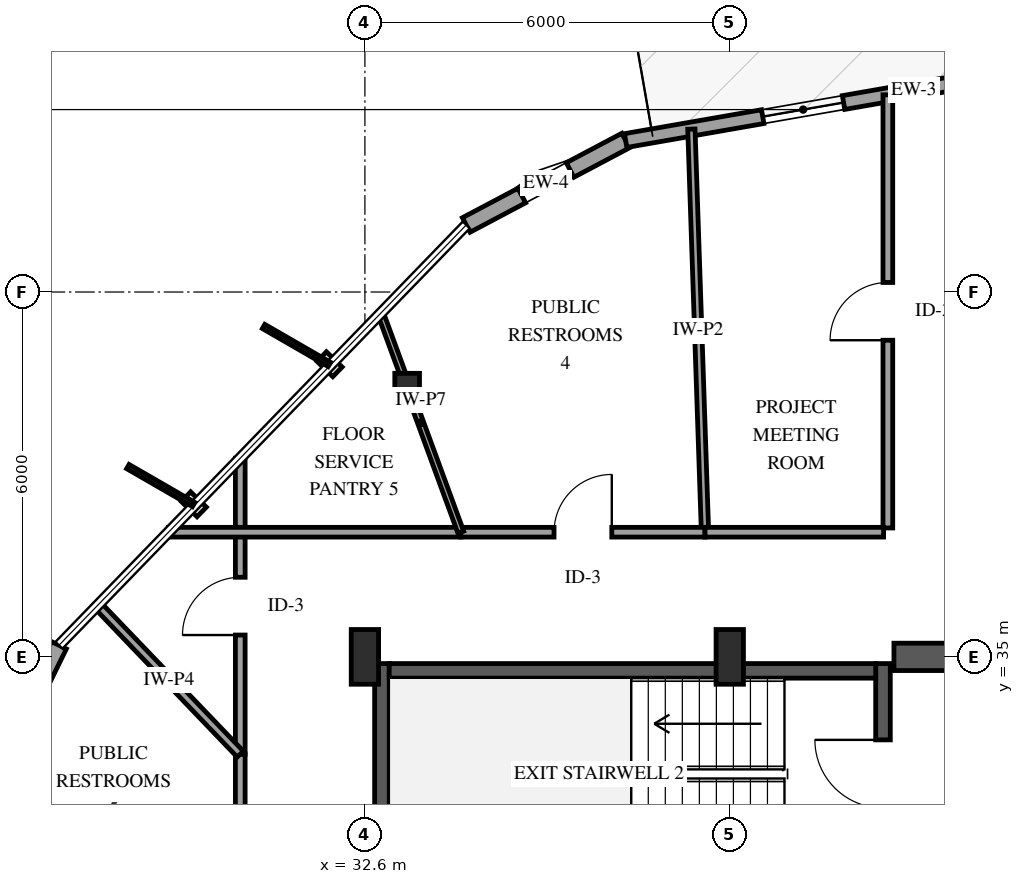
"""IFC4 building model, lengths in metres.
Left out: names, types, materials, properties, quantities, classifications, styles, units other than length and angle.
Written with IfcOpenShell. Run it as: python <this file> out.ifc"""

import sys

from ifc_helpers import new_model, si_unit, direction, frame, frame_2d, origin, origin_2d, place, context, subcontext, project, spatial, rectangle, i_section, extrude, element, fill, save


model = new_model("IFC4")
c1 = context("Model", 3, precision=1e-05, world=origin(), true_north=direction((0.0, 1.0)))
c2 = subcontext(c1, "Body", "Model", "MODEL_VIEW")
j1 = project(units=[si_unit("LENGTHUNIT", "METRE"), si_unit("PLANEANGLEUNIT", "RADIAN")], contexts=[c1])
p1 = place(None, origin())
s1 = spatial("IfcSite", under=j1, at=p1, CompositionType="ELEMENT")
p2 = place(p1, origin())
s2 = spatial("IfcBuilding", under=s1, at=p2, CompositionType="ELEMENT")
p3 = place(p2, frame((0.0, 0.0, 201.4)))
s3 = spatial("IfcBuildingStorey", under=s2, at=p3, CompositionType="ELEMENT", Elevation=201.4)
p4 = place(p3, frame((32.88, 31.26, 0.0), z_axis=(0.0, 0.0, 1.0), x_axis=(0.0, 1.0, 0.0)))
e1 = element("IfcWall", 1, at=p4, inside=s3, PredefinedType="SHEAR", context=c2, shape_type="SweptSolid", body=[
    extrude(rectangle(XDim=3.63, YDim=0.24, at=frame_2d((1.815, 0.0))), origin(), (0.0, 0.0, 1.0), 3.6),
])
p5 = place(p3, frame((41.12, 31.26, 0.0), z_axis=(0.0, 0.0, 1.0), x_axis=(0.0, 1.0, 0.0)))
e2 = element("IfcWall", 2, at=p5, inside=s3, PredefinedType="SHEAR", context=c2, shape_type="SweptSolid", body=[
    extrude(rectangle(XDim=3.63, YDim=0.24, at=frame_2d((1.815, 0.0))), origin(), (0.0, 0.0, 1.0), 3.6),
])
p6 = place(p5, frame((1.255, 0.0, 0.0)))
e3 = element("IfcOpeningElement", 3, at=p6, cuts=e2, PredefinedType="OPENING", context=c2, shape_type="SweptSolid", body=[
    extrude(rectangle(XDim=1.12, YDim=2.15, at=frame_2d((0.56, 1.075))), frame((0.0, 0.13, 0.0), z_axis=(0.0, -1.0, 0.0), x_axis=(1.0, 0.0, 0.0)), (0.0, 0.0, 1.0), 0.26),
])
p7 = place(p3, frame((33.0, 34.77, 0.0), z_axis=(0.0, 0.0, 1.0), x_axis=(1.0, 0.0, 0.0)))
e4 = element("IfcWall", 4, at=p7, inside=s3, PredefinedType="SHEAR", context=c2, shape_type="SweptSolid", body=[
    extrude(rectangle(XDim=8.0, YDim=0.24, at=frame_2d((4.0, 0.0))), origin(), (0.0, 0.0, 1.0), 3.6),
])
p8 = place(p3, frame((41.3, 35.0, 0.0), z_axis=(0.0, 0.0, 1.0), x_axis=(1.0, 0.0, 0.0)))
e5 = element("IfcWall", 5, at=p8, inside=s3, PredefinedType="SHEAR", context=c2, shape_type="SweptSolid", body=[
    extrude(rectangle(XDim=2.85, YDim=0.45, at=frame_2d((1.425, 0.0))), origin(), (0.0, 0.0, 1.0), 3.6),
])
for number, where, z_axis, x_axis in (
    (6, (32.6, 35.0, 0.0), (0.0, 0.0, 1.0), (1.0, 0.0, 0.0)),
    (7, (38.6, 35.0, 0.0), (0.0, 0.0, 1.0), (1.0, 0.0, 0.0)),
):
    element("IfcColumn", number, at=place(p3, frame(where, z_axis=z_axis, x_axis=x_axis)), inside=s3, PredefinedType="PILASTER", context=c2, shape_type="SweptSolid", body=[
        extrude(rectangle(XDim=0.45, YDim=0.9, at=origin_2d()), origin(), (0.0, 0.0, 1.0), 3.6),
    ])
p9 = place(p3, frame((33.295, 39.455, 0.0), z_axis=(0.0, 0.0, 1.0), x_axis=(1.0, 0.0, 0.0)))
e8 = element("IfcColumn", 8, at=p9, inside=s3, PredefinedType="COLUMN", context=c2, shape_type="SweptSolid", body=[
    extrude(i_section(OverallWidth=0.406, OverallDepth=0.416, WebThickness=0.03, FlangeThickness=0.048, FilletRadius=0.038, at=origin_2d()), origin(), (0.0, 0.0, 1.0), 3.6),
])
p10 = place(p3, frame((36.888, 43.49, 0.0), z_axis=(0.0, 0.0, 1.0), x_axis=(-0.883799927138, -0.467865032664, 0.0)))
e9 = element("IfcWall", 9, at=p10, inside=s3, PredefinedType="SOLIDWALL", context=c2, shape_type="SweptSolid", body=[
    extrude(rectangle(XDim=2.967, YDim=0.27, at=frame_2d((1.483, 0.0))), origin(), (0.0, 0.0, 1.0), 2.679),
])
p11 = place(p10, frame((1.033, 0.0, 0.75)))
e10 = element("IfcOpeningElement", 10, at=p11, cuts=e9, PredefinedType="OPENING", context=c2, shape_type="SweptSolid", body=[
    extrude(rectangle(XDim=0.9, YDim=1.5, at=frame_2d((0.45, 0.75))), frame((0.0, 0.145, 0.0), z_axis=(0.0, -1.0, 0.0), x_axis=(1.0, 0.0, 0.0)), (0.0, 0.0, 1.0), 0.29),
])
p12 = place(p3, frame((46.369, 45.145, 0.0), z_axis=(0.0, 0.0, 1.0), x_axis=(-0.985106934839, -0.171942801338, 0.0)))
e11 = element("IfcWall", 11, at=p12, inside=s3, PredefinedType="SOLIDWALL", context=c2, shape_type="SweptSolid", body=[
    extrude(rectangle(XDim=9.624, YDim=0.23, at=frame_2d((4.812, 0.0))), origin(), (0.0, 0.0, 1.0), 2.679),
])
p13 = place(p12, frame((0.65, 0.0, 0.0)))
e12 = element("IfcOpeningElement", 12, at=p13, cuts=e11, PredefinedType="OPENING", context=c2, shape_type="SweptSolid", body=[
    extrude(rectangle(XDim=1.0, YDim=2.15, at=frame_2d((0.5, 1.075))), frame((0.0, 0.125, 0.0), z_axis=(0.0, -1.0, 0.0), x_axis=(1.0, 0.0, 0.0)), (0.0, 0.0, 1.0), 0.25),
])
p14 = place(p12, frame((5.986, 0.0, 0.72)))
e13 = element("IfcOpeningElement", 13, at=p14, cuts=e11, PredefinedType="OPENING", context=c2, shape_type="SweptSolid", body=[
    extrude(rectangle(XDim=1.35, YDim=1.65, at=frame_2d((0.675, 0.825))), frame((0.0, 0.125, 0.0), z_axis=(0.0, -1.0, 0.0), x_axis=(1.0, 0.0, 0.0)), (0.0, 0.0, 1.0), 0.25),
])
p15 = place(p3, frame((27.569, 35.191, 0.0), z_axis=(0.0, 0.0, 1.0), x_axis=(-0.439956847616, -0.898018915299, 0.0)))
e14 = element("IfcWall", 14, at=p15, inside=s3, PredefinedType="SOLIDWALL", context=c2, shape_type="SweptSolid", body=[
    extrude(rectangle(XDim=2.967, YDim=0.27, at=frame_2d((1.483, 0.0))), origin(), (0.0, 0.0, 1.0), 2.679),
])
p16 = place(p15, frame((1.033, 0.0, 0.75)))
e15 = element("IfcOpeningElement", 15, at=p16, cuts=e14, PredefinedType="OPENING", context=c2, shape_type="SweptSolid", body=[
    extrude(rectangle(XDim=0.9, YDim=1.5, at=frame_2d((0.45, 0.75))), frame((0.0, 0.145, 0.0), z_axis=(0.0, -1.0, 0.0), x_axis=(1.0, 0.0, 0.0)), (0.0, 0.0, 1.0), 0.29),
])
p17 = place(p3, frame((41.2, 37.12, 0.0), z_axis=(0.0, 0.0, 1.0), x_axis=(0.0, 1.0, 0.0)))
e16 = element("IfcWall", 16, at=p17, inside=s3, PredefinedType="PARTITIONING", context=c2, shape_type="SweptSolid", body=[
    extrude(rectangle(XDim=7.123, YDim=0.16, at=frame_2d((3.562, 0.0))), origin(), (0.0, 0.0, 1.0), 3.3),
])
p18 = place(p17, frame((3.087, 0.0, 0.0)))
e17 = element("IfcOpeningElement", 17, at=p18, cuts=e16, PredefinedType="OPENING", context=c2, shape_type="SweptSolid", body=[
    extrude(rectangle(XDim=0.95, YDim=2.15, at=frame_2d((0.475, 1.075))), frame((0.0, 0.09, 0.0), z_axis=(0.0, -1.0, 0.0), x_axis=(1.0, 0.0, 0.0)), (0.0, 0.0, 1.0), 0.18),
])
p19 = place(p3, frame((38.193, 37.05, 0.0), z_axis=(0.0, 0.0, 1.0), x_axis=(-0.033790356862, 0.999428942838, 0.0)))
e18 = element("IfcWall", 18, at=p19, inside=s3, PredefinedType="PARTITIONING", context=c2, shape_type="SweptSolid", body=[
    extrude(rectangle(XDim=6.633, YDim=0.12, at=frame_2d((3.316, 0.0))), origin(), (0.0, 0.0, 1.0), 3.3),
])
p20 = place(p3, frame((30.55, 28.351, 0.0), z_axis=(0.0, 0.0, 1.0), x_axis=(0.0, 1.0, 0.0)))
e19 = element("IfcWall", 19, at=p20, inside=s3, PredefinedType="PARTITIONING", context=c2, shape_type="SweptSolid", body=[
    extrude(rectangle(XDim=5.05, YDim=0.16, at=frame_2d((2.525, 0.0))), origin(), (0.0, 0.0, 1.0), 3.3),
])
p21 = place(p20, frame((2.05, 0.0, 0.0)))
e20 = element("IfcOpeningElement", 20, at=p21, cuts=e19, PredefinedType="OPENING", context=c2, shape_type="SweptSolid", body=[
    extrude(rectangle(XDim=0.95, YDim=2.15, at=frame_2d((0.475, 1.075))), frame((0.0, 0.09, 0.0), z_axis=(0.0, -1.0, 0.0), x_axis=(1.0, 0.0, 0.0)), (0.0, 0.0, 1.0), 0.18),
])
p22 = place(p3, frame((30.55, 33.401, 0.0), z_axis=(0.0, 0.0, 1.0), x_axis=(0.0, 1.0, 0.0)))
e21 = element("IfcWall", 21, at=p22, inside=s3, PredefinedType="PARTITIONING", context=c2, shape_type="SweptSolid", body=[
    extrude(rectangle(XDim=4.866, YDim=0.16, at=frame_2d((2.433, 0.0))), origin(), (0.0, 0.0, 1.0), 3.3),
])
p23 = place(p22, frame((1.958, 0.0, 0.0)))
e22 = element("IfcOpeningElement", 22, at=p23, cuts=e21, PredefinedType="OPENING", context=c2, shape_type="SweptSolid", body=[
    extrude(rectangle(XDim=0.95, YDim=2.15, at=frame_2d((0.475, 1.075))), frame((0.0, 0.09, 0.0), z_axis=(0.0, -1.0, 0.0), x_axis=(1.0, 0.0, 0.0)), (0.0, 0.0, 1.0), 0.18),
])
p24 = place(p3, frame((29.37, 37.05, 0.0), z_axis=(0.0, 0.0, 1.0), x_axis=(1.0, 0.0, 0.0)))
e23 = element("IfcWall", 23, at=p24, inside=s3, PredefinedType="PARTITIONING", context=c2, shape_type="SweptSolid", body=[
    extrude(rectangle(XDim=4.807, YDim=0.16, at=frame_2d((2.403, 0.0))), origin(), (0.0, 0.0, 1.0), 3.3),
])
p25 = place(p3, frame((34.177, 37.05, 0.0), z_axis=(0.0, 0.0, 1.0), x_axis=(1.0, 0.0, 0.0)))
e24 = element("IfcWall", 24, at=p25, inside=s3, PredefinedType="PARTITIONING", context=c2, shape_type="SweptSolid", body=[
    extrude(rectangle(XDim=4.016, YDim=0.16, at=frame_2d((2.008, 0.0))), origin(), (0.0, 0.0, 1.0), 3.3),
])
p26 = place(p25, frame((1.533, 0.0, 0.0)))
e25 = element("IfcOpeningElement", 25, at=p26, cuts=e24, PredefinedType="OPENING", context=c2, shape_type="SweptSolid", body=[
    extrude(rectangle(XDim=0.95, YDim=2.15, at=frame_2d((0.475, 1.075))), frame((0.0, 0.09, 0.0), z_axis=(0.0, -1.0, 0.0), x_axis=(1.0, 0.0, 0.0)), (0.0, 0.0, 1.0), 0.18),
])
p27 = place(p3, frame((34.177, 37.05, 0.0), z_axis=(0.0, 0.0, 1.0), x_axis=(-0.344447438481, 0.938805604012, 0.0)))
e26 = element("IfcWall", 26, at=p27, inside=s3, PredefinedType="PARTITIONING", context=c2, shape_type="SweptSolid", body=[
    extrude(rectangle(XDim=3.833, YDim=0.1, at=frame_2d((1.916, 0.0))), origin(), (0.0, 0.0, 1.0), 2.595),
])
p28 = place(p3, frame((30.55, 33.401, 0.0), z_axis=(0.0, 0.0, 1.0), x_axis=(-0.691891282154, 0.722001699222, 0.0)))
e27 = element("IfcWall", 27, at=p28, inside=s3, PredefinedType="PARTITIONING", context=c2, shape_type="SweptSolid", body=[
    extrude(rectangle(XDim=3.389, YDim=0.14, at=frame_2d((1.695, 0.0))), origin(), (0.0, 0.0, 1.0), 3.3),
])
p29 = place(p3, frame((38.193, 37.05, 0.0), z_axis=(0.0, 0.0, 1.0), x_axis=(1.0, 0.0, 0.0)))
e28 = element("IfcWall", 28, at=p29, inside=s3, PredefinedType="PARTITIONING", context=c2, shape_type="SweptSolid", body=[
    extrude(rectangle(XDim=2.937, YDim=0.16, at=frame_2d((1.468, 0.0))), origin(), (0.0, 0.0, 1.0), 3.3),
])
p30 = place(p11, origin())
e29 = element("IfcWindow", 29, at=p30, inside=s3, PartitioningType="SINGLE_PANEL", PredefinedType="WINDOW", context=c2, shape_type="SweptSolid", body=[
    extrude(rectangle(XDim=0.9, YDim=1.5, at=frame_2d((0.45, 0.75))), frame((0.0, 0.03, 0.0), z_axis=(0.0, -1.0, 0.0), x_axis=(1.0, 0.0, 0.0)), (0.0, 0.0, 1.0), 0.06),
])
fill(e10, e29)
p31 = place(p14, origin())
e30 = element("IfcWindow", 30, at=p31, inside=s3, PartitioningType="SINGLE_PANEL", PredefinedType="WINDOW", context=c2, shape_type="SweptSolid", body=[
    extrude(rectangle(XDim=1.35, YDim=1.65, at=frame_2d((0.675, 0.825))), frame((0.0, 0.03, 0.0), z_axis=(0.0, -1.0, 0.0), x_axis=(1.0, 0.0, 0.0)), (0.0, 0.0, 1.0), 0.06),
])
fill(e13, e30)
p32 = place(p6, origin())
e31 = element("IfcDoor", 31, at=p32, inside=s3, OperationType="SINGLE_SWING_RIGHT", PredefinedType="DOOR", context=c2, shape_type="SweptSolid", body=[
    extrude(rectangle(XDim=1.12, YDim=2.15, at=frame_2d((0.56, 1.075))), frame((0.0, 0.025, 0.0), z_axis=(0.0, -1.0, 0.0), x_axis=(1.0, 0.0, 0.0)), (0.0, 0.0, 1.0), 0.05),
])
fill(e3, e31)
p33 = place(p18, origin())
e32 = element("IfcDoor", 32, at=p33, inside=s3, OperationType="SINGLE_SWING_LEFT", PredefinedType="DOOR", context=c2, shape_type="SweptSolid", body=[
    extrude(rectangle(XDim=0.95, YDim=2.15, at=frame_2d((0.475, 1.075))), frame((0.0, 0.025, 0.0), z_axis=(0.0, -1.0, 0.0), x_axis=(1.0, 0.0, 0.0)), (0.0, 0.0, 1.0), 0.05),
])
fill(e17, e32)
p34 = place(p23, origin())
e33 = element("IfcDoor", 33, at=p34, inside=s3, OperationType="SINGLE_SWING_LEFT", PredefinedType="DOOR", context=c2, shape_type="SweptSolid", body=[
    extrude(rectangle(XDim=0.95, YDim=2.15, at=frame_2d((0.475, 1.075))), frame((0.0, 0.025, 0.0), z_axis=(0.0, -1.0, 0.0), x_axis=(1.0, 0.0, 0.0)), (0.0, 0.0, 1.0), 0.05),
])
fill(e22, e33)
p35 = place(p26, origin())
e34 = element("IfcDoor", 34, at=p35, inside=s3, OperationType="SINGLE_SWING_RIGHT", PredefinedType="DOOR", context=c2, shape_type="SweptSolid", body=[
    extrude(rectangle(XDim=0.95, YDim=2.15, at=frame_2d((0.475, 1.075))), frame((0.0, 0.025, 0.0), z_axis=(0.0, -1.0, 0.0), x_axis=(1.0, 0.0, 0.0)), (0.0, 0.0, 1.0), 0.05),
])
fill(e25, e34)
save(model, sys.argv[1])
